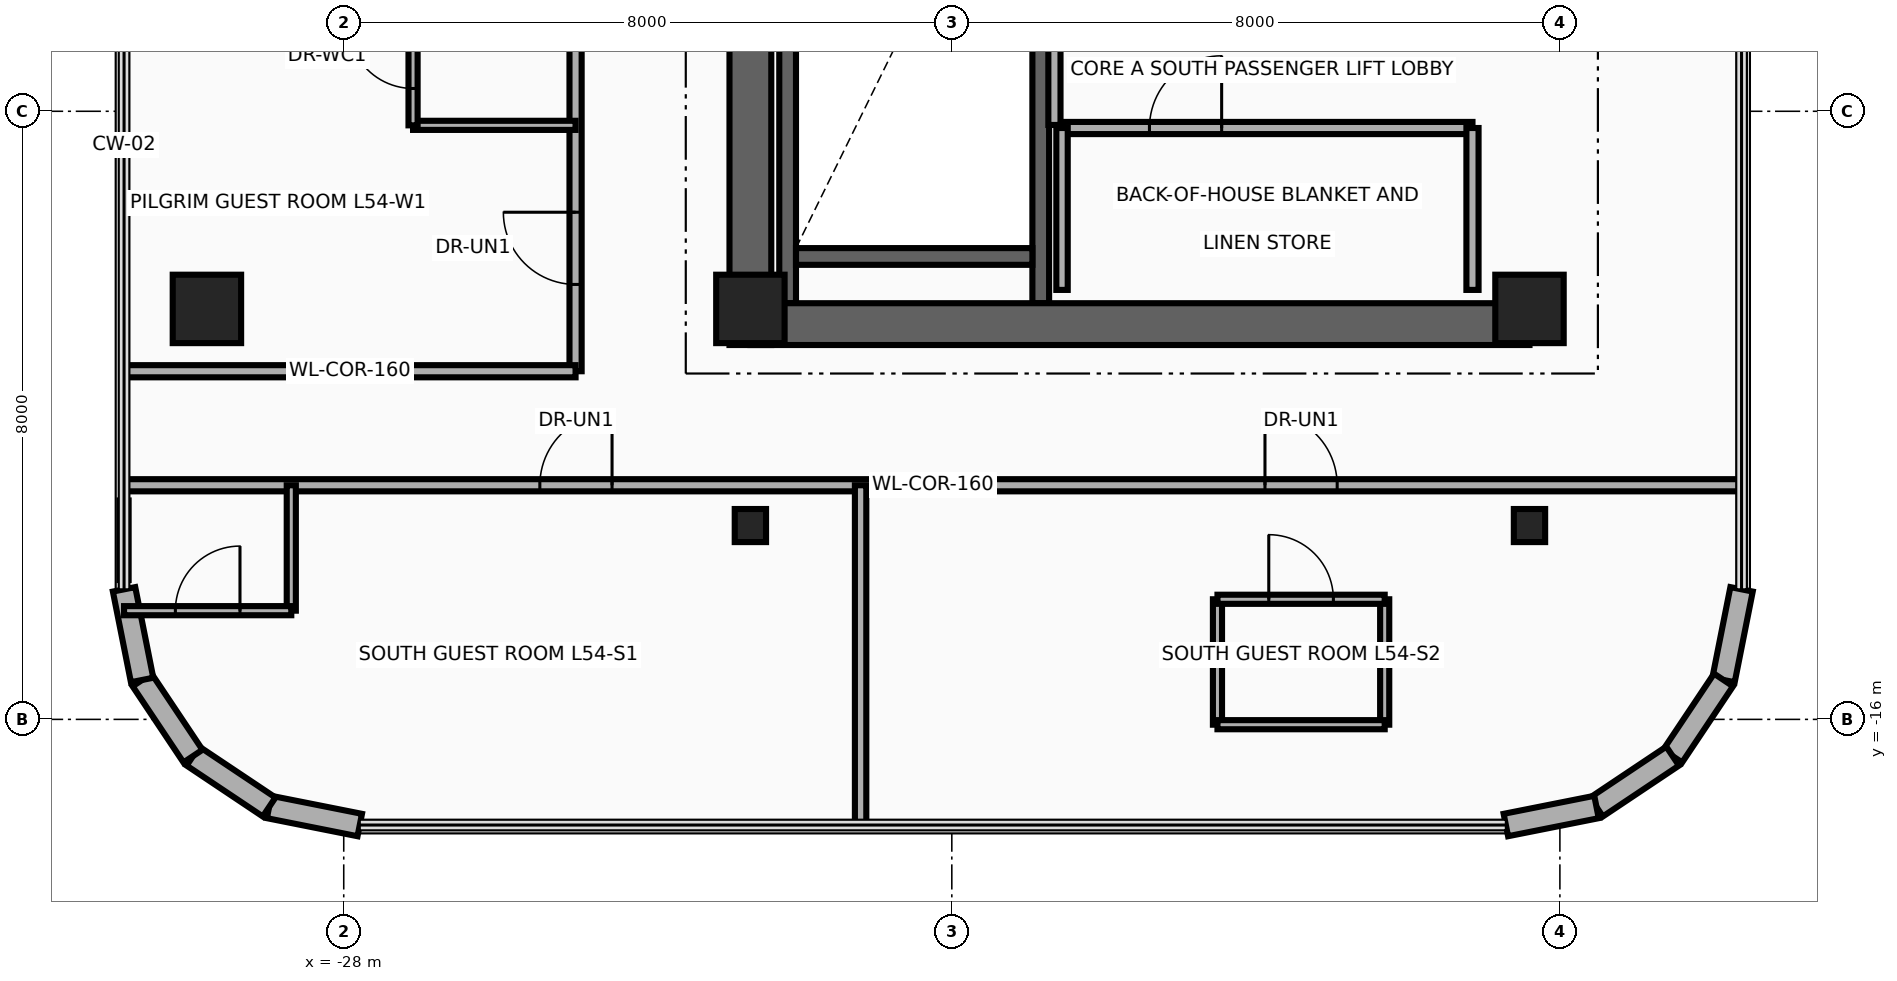
"""IFC4 building model, lengths in metres.
Left out: names, types, materials, properties, quantities, classifications, styles, units other than length and angle.
Written with IfcOpenShell. Run it as: python <this file> out.ifc"""

import sys

from ifc_helpers import new_model, si_unit, direction, frame, frame_2d, origin, origin_2d, place, context, subcontext, project, spatial, rectangle, i_section, extrude, source, transform, mapped, element, fill, save


model = new_model("IFC4")
c1 = context("Model", 3, precision=1e-05, world=origin(), true_north=direction((0.0, 1.0)))
c2 = subcontext(c1, "Body", "Model", "MODEL_VIEW")
j1 = project(units=[si_unit("LENGTHUNIT", "METRE"), si_unit("PLANEANGLEUNIT", "RADIAN")], contexts=[c1])
p1 = place(None, origin())
s1 = spatial("IfcSite", under=j1, at=p1, CompositionType="ELEMENT")
p2 = place(p1, origin())
s2 = spatial("IfcBuilding", under=s1, at=p2, CompositionType="ELEMENT")
p3 = place(p2, frame((0.0, 0.0, 212.5)))
s3 = spatial("IfcBuildingStorey", under=s2, at=p3, CompositionType="ELEMENT", Elevation=212.5)
for number, where, z_axis, x_axis in (
    (1, (-22.16, -10.525, 0.0), (0.0, 0.0, 1.0), (0.0, 1.0, 0.0)),
    (2, (-18.83, -10.525, 0.0), (0.0, 0.0, 1.0), (0.0, 1.0, 0.0)),
):
    element("IfcWall", number, at=place(p3, frame(where, z_axis=z_axis, x_axis=x_axis)), inside=s3, PredefinedType="SHEAR", context=c2, shape_type="SweptSolid", body=[
        extrude(rectangle(XDim=8.745, YDim=0.22, at=frame_2d((4.373, 0.0))), origin(), (0.0, 0.0, 1.0), 3.26),
    ])
p4 = place(p3, frame((-22.05, -9.91, 0.0), z_axis=(0.0, 0.0, 1.0), x_axis=(1.0, 0.0, 0.0)))
e3 = element("IfcWall", 3, at=p4, inside=s3, PredefinedType="SHEAR", context=c2, shape_type="SweptSolid", body=[
    extrude(rectangle(XDim=3.11, YDim=0.22, at=frame_2d((1.555, 0.0))), origin(), (0.0, 0.0, 1.0), 3.26),
])
p5 = place(p3, frame((-22.65, -11.075, 0.0), z_axis=(0.0, 0.0, 1.0), x_axis=(0.0, 1.0, 0.0)))
e4 = element("IfcWall", 4, at=p5, inside=s3, PredefinedType="SHEAR", context=c2, shape_type="SweptSolid", body=[
    extrude(rectangle(XDim=22.15, YDim=0.55, at=frame_2d((11.075, 0.0))), origin(), (0.0, 0.0, 1.0), 3.26),
])
p6 = place(p3, frame((-22.65, -10.8, 0.0), z_axis=(0.0, 0.0, 1.0), x_axis=(1.0, 0.0, 0.0)))
e5 = element("IfcWall", 5, at=p6, inside=s3, PredefinedType="SHEAR", context=c2, shape_type="SweptSolid", body=[
    extrude(rectangle(XDim=10.25, YDim=0.55, at=frame_2d((5.125, 0.0))), origin(), (0.0, 0.0, 1.0), 3.26),
])
m1 = source(origin(), c2, "Body", "SweptSolid", [
    extrude(rectangle(XDim=0.9, YDim=0.9, at=origin_2d()), origin(), (0.0, 0.0, 1.0), 3.5),
])
for number, where, z_axis, x_axis in (
    (6, (-29.8, -10.6, 0.0), (0.0, 0.0, 1.0), (1.0, 0.0, 0.0)),
    (7, (-22.65, -10.6, 0.0), (0.0, 0.0, 1.0), (1.0, 0.0, 0.0)),
    (8, (-12.4, -10.6, 0.0), (0.0, 0.0, 1.0), (1.0, 0.0, 0.0)),
):
    element("IfcColumn", number, at=place(p3, frame(where, z_axis=z_axis, x_axis=x_axis)), inside=s3, PredefinedType="COLUMN", context=c2, shape_type="MappedRepresentation", body=[
        mapped(m1, transform((0.0, 0.0, 0.0), x_axis=(1.0, 0.0, 0.0), y_axis=(0.0, 1.0, 0.0), z_axis=(0.0, 0.0, 1.0), scale=1.0)),
    ])
m2 = source(origin(), c2, "Body", "SweptSolid", [
    extrude(i_section(OverallWidth=0.412, OverallDepth=0.435, WebThickness=0.036, FlangeThickness=0.057, at=origin_2d()), origin(), (0.0, 0.0, 1.0), 3.5),
])
for number, where, z_axis, x_axis in (
    (9, (-22.65, -13.45, 0.0), (0.0, 0.0, 1.0), (1.0, 0.0, 0.0)),
    (10, (-12.4, -13.45, 0.0), (0.0, 0.0, 1.0), (1.0, 0.0, 0.0)),
):
    element("IfcColumn", number, at=place(p3, frame(where, z_axis=z_axis, x_axis=x_axis)), inside=s3, PredefinedType="COLUMN", context=c2, shape_type="MappedRepresentation", body=[
        mapped(m2, transform((0.0, 0.0, 0.0), x_axis=(1.0, 0.0, 0.0), y_axis=(0.0, 1.0, 0.0), z_axis=(0.0, 0.0, 1.0), scale=1.0)),
    ])
p7 = place(p3, frame((-9.61, -14.289, 0.0), z_axis=(0.0, 0.0, 1.0), x_axis=(-0.194996050505, -0.980804027463, 0.0)))
e11 = element("IfcWall", 11, at=p7, inside=s3, PredefinedType="SOLIDWALL", context=c2, shape_type="SweptSolid", body=[
    extrude(rectangle(XDim=1.216, YDim=0.3, at=frame_2d((0.608, 0.0))), origin(), (0.0, 0.0, 1.0), 3.26),
])
for number, where, z_axis, x_axis in (
    (12, (-9.847, -15.482, 0.0), (0.0, 0.0, 1.0), (-0.556, -0.831, 0.0)),
    (13, (-10.517, -16.483, 0.0), (0.0, 0.0, 1.0), (-0.831, -0.556, 0.0)),
):
    element("IfcWall", number, at=place(p3, frame(where, z_axis=z_axis, x_axis=x_axis)), inside=s3, PredefinedType="SOLIDWALL", context=c2, shape_type="SweptSolid", body=[
        extrude(rectangle(XDim=1.205, YDim=0.3, at=frame_2d((0.603, 0.0))), origin(), (0.0, 0.0, 1.0), 3.26),
    ])
for number, where, z_axis, x_axis in (
    (14, (-11.518, -17.153, 0.0), (0.0, 0.0, 1.0), (-0.981, -0.195, 0.0)),
    (15, (-27.789, -17.39, 0.0), (0.0, 0.0, 1.0), (-0.981, 0.195, 0.0)),
):
    element("IfcWall", number, at=place(p3, frame(where, z_axis=z_axis, x_axis=x_axis)), inside=s3, PredefinedType="SOLIDWALL", context=c2, shape_type="SweptSolid", body=[
        extrude(rectangle(XDim=1.216, YDim=0.3, at=frame_2d((0.608, 0.0))), origin(), (0.0, 0.0, 1.0), 3.26),
    ])
for number, where, z_axis, x_axis in (
    (16, (-28.982, -17.153, 0.0), (0.0, 0.0, 1.0), (-0.831, 0.556, 0.0)),
    (17, (-29.983, -16.483, 0.0), (0.0, 0.0, 1.0), (-0.556, 0.831, 0.0)),
):
    element("IfcWall", number, at=place(p3, frame(where, z_axis=z_axis, x_axis=x_axis)), inside=s3, PredefinedType="SOLIDWALL", context=c2, shape_type="SweptSolid", body=[
        extrude(rectangle(XDim=1.205, YDim=0.3, at=frame_2d((0.603, 0.0))), origin(), (0.0, 0.0, 1.0), 3.26),
    ])
p8 = place(p3, frame((-30.653, -15.482, 0.0), z_axis=(0.0, 0.0, 1.0), x_axis=(-0.194996050505, 0.980804027463, 0.0)))
e18 = element("IfcWall", 18, at=p8, inside=s3, PredefinedType="SOLIDWALL", context=c2, shape_type="SweptSolid", body=[
    extrude(rectangle(XDim=1.216, YDim=0.3, at=frame_2d((0.608, 0.0))), origin(), (0.0, 0.0, 1.0), 3.26),
])
p9 = place(p3, frame((-18.65, -8.18, 0.0), z_axis=(0.0, 0.0, 1.0), x_axis=(0.0, 1.0, 0.0)))
e19 = element("IfcWall", 19, at=p9, inside=s3, PredefinedType="PARTITIONING", context=c2, shape_type="SweptSolid", body=[
    extrude(rectangle(XDim=1.56, YDim=0.16, at=frame_2d((0.78, 0.0))), origin(), (0.0, 0.0, 1.0), 3.26),
])
p10 = place(p3, frame((-18.55, -8.22, 0.0), z_axis=(0.0, 0.0, 1.0), x_axis=(1.0, 0.0, 0.0)))
e20 = element("IfcWall", 20, at=p10, inside=s3, PredefinedType="PARTITIONING", context=c2, shape_type="SweptSolid", body=[
    extrude(rectangle(XDim=5.4, YDim=0.16, at=frame_2d((2.7, 0.0))), origin(), (0.0, 0.0, 1.0), 3.26),
])
p11 = place(p10, frame((1.15, 0.0, 0.0)))
e21 = element("IfcOpeningElement", 21, at=p11, cuts=e20, PredefinedType="OPENING", context=c2, shape_type="SweptSolid", body=[
    extrude(rectangle(XDim=0.95, YDim=2.15, at=frame_2d((0.475, 1.075))), frame((0.0, 0.095, 0.0), z_axis=(0.0, -1.0, 0.0), x_axis=(1.0, 0.0, 0.0)), (0.0, 0.0, 1.0), 0.19),
])
p12 = place(p3, frame((-18.55, -10.35, 0.0), z_axis=(0.0, 0.0, 1.0), x_axis=(0.0, 1.0, 0.0)))
e22 = element("IfcWall", 22, at=p12, inside=s3, PredefinedType="PARTITIONING", context=c2, shape_type="SweptSolid", body=[
    extrude(rectangle(XDim=2.13, YDim=0.15, at=frame_2d((1.065, 0.0))), origin(), (0.0, 0.0, 1.0), 3.26),
])
p13 = place(p3, frame((-13.15, -10.35, 0.0), z_axis=(0.0, 0.0, 1.0), x_axis=(0.0, 1.0, 0.0)))
e23 = element("IfcWall", 23, at=p13, inside=s3, PredefinedType="PARTITIONING", context=c2, shape_type="SweptSolid", body=[
    extrude(rectangle(XDim=2.13, YDim=0.16, at=frame_2d((1.065, 0.0))), origin(), (0.0, 0.0, 1.0), 3.26),
])
p14 = place(p3, frame((-24.95, -11.42, 0.0), z_axis=(0.0, 0.0, 1.0), x_axis=(0.0, 1.0, 0.0)))
e24 = element("IfcWall", 24, at=p14, inside=s3, PredefinedType="PARTITIONING", context=c2, shape_type="SweptSolid", body=[
    extrude(rectangle(XDim=20.22, YDim=0.16, at=frame_2d((10.11, 0.0))), origin(), (0.0, 0.0, 1.0), 2.544),
])
p15 = place(p14, frame((1.142, 0.0, 0.0)))
e25 = element("IfcOpeningElement", 25, at=p15, cuts=e24, PredefinedType="OPENING", context=c2, shape_type="SweptSolid", body=[
    extrude(rectangle(XDim=0.95, YDim=2.15, at=frame_2d((0.475, 1.075))), frame((0.0, 0.095, 0.0), z_axis=(0.0, -1.0, 0.0), x_axis=(1.0, 0.0, 0.0)), (0.0, 0.0, 1.0), 0.19),
])
p16 = place(p14, frame((8.018, 0.0, 0.0)))
e26 = element("IfcOpeningElement", 26, at=p16, cuts=e24, PredefinedType="OPENING", context=c2, shape_type="SweptSolid", body=[
    extrude(rectangle(XDim=0.95, YDim=2.15, at=frame_2d((0.475, 1.075))), frame((0.0, 0.095, 0.0), z_axis=(0.0, -1.0, 0.0), x_axis=(1.0, 0.0, 0.0)), (0.0, 0.0, 1.0), 0.19),
])
p17 = place(p14, frame((11.252, 0.0, 0.0)))
e27 = element("IfcOpeningElement", 27, at=p17, cuts=e24, PredefinedType="OPENING", context=c2, shape_type="SweptSolid", body=[
    extrude(rectangle(XDim=0.95, YDim=2.15, at=frame_2d((0.475, 1.075))), frame((0.0, 0.095, 0.0), z_axis=(0.0, -1.0, 0.0), x_axis=(1.0, 0.0, 0.0)), (0.0, 0.0, 1.0), 0.19),
])
p18 = place(p14, frame((18.127, 0.0, 0.0)))
e28 = element("IfcOpeningElement", 28, at=p18, cuts=e24, PredefinedType="OPENING", context=c2, shape_type="SweptSolid", body=[
    extrude(rectangle(XDim=0.95, YDim=2.15, at=frame_2d((0.475, 1.075))), frame((0.0, 0.095, 0.0), z_axis=(0.0, -1.0, 0.0), x_axis=(1.0, 0.0, 0.0)), (0.0, 0.0, 1.0), 0.19),
])
p19 = place(p3, frame((-27.088, -8.185, 0.0), z_axis=(0.0, 0.0, 1.0), x_axis=(1.0, 0.0, 0.0)))
e29 = element("IfcWall", 29, at=p19, inside=s3, PredefinedType="PARTITIONING", context=c2, shape_type="SweptSolid", body=[
    extrude(rectangle(XDim=2.138, YDim=0.12, at=frame_2d((1.069, 0.0))), origin(), (0.0, 0.0, 1.0), 3.26),
])
p20 = place(p3, frame((-27.088, -8.185, 0.0), z_axis=(0.0, 0.0, 1.0), x_axis=(0.0, 1.0, 0.0)))
e30 = element("IfcWall", 30, at=p20, inside=s3, PredefinedType="PARTITIONING", context=c2, shape_type="SweptSolid", body=[
    extrude(rectangle(XDim=1.82, YDim=0.12, at=frame_2d((0.91, 0.0))), origin(), (0.0, 0.0, 1.0), 2.788),
])
p21 = place(p20, frame((0.485, 0.0, 0.0)))
e31 = element("IfcOpeningElement", 31, at=p21, cuts=e30, PredefinedType="OPENING", context=c2, shape_type="SweptSolid", body=[
    extrude(rectangle(XDim=0.85, YDim=2.1, at=frame_2d((0.425, 1.05))), frame((0.0, 0.075, 0.0), z_axis=(0.0, -1.0, 0.0), x_axis=(1.0, 0.0, 0.0)), (0.0, 0.0, 1.0), 0.15),
])
p22 = place(p3, frame((-30.89, -12.92, 0.0), z_axis=(0.0, 0.0, 1.0), x_axis=(1.0, 0.0, 0.0)))
e32 = element("IfcWall", 32, at=p22, inside=s3, PredefinedType="PARTITIONING", context=c2, shape_type="SweptSolid", body=[
    extrude(rectangle(XDim=21.28, YDim=0.16, at=frame_2d((10.64, 0.0))), origin(), (0.0, 0.0, 1.0), 2.634),
])
p23 = place(p22, frame((5.47, 0.0, 0.0)))
e33 = element("IfcOpeningElement", 33, at=p23, cuts=e32, PredefinedType="OPENING", context=c2, shape_type="SweptSolid", body=[
    extrude(rectangle(XDim=0.95, YDim=2.15, at=frame_2d((0.475, 1.075))), frame((0.0, 0.095, 0.0), z_axis=(0.0, -1.0, 0.0), x_axis=(1.0, 0.0, 0.0)), (0.0, 0.0, 1.0), 0.19),
])
p24 = place(p22, frame((15.01, 0.0, 0.0)))
e34 = element("IfcOpeningElement", 34, at=p24, cuts=e32, PredefinedType="OPENING", context=c2, shape_type="SweptSolid", body=[
    extrude(rectangle(XDim=0.95, YDim=2.15, at=frame_2d((0.475, 1.075))), frame((0.0, 0.095, 0.0), z_axis=(0.0, -1.0, 0.0), x_axis=(1.0, 0.0, 0.0)), (0.0, 0.0, 1.0), 0.19),
])
p25 = place(p3, frame((-21.2, -17.39, 0.0), z_axis=(0.0, 0.0, 1.0), x_axis=(0.0, 1.0, 0.0)))
e35 = element("IfcWall", 35, at=p25, inside=s3, PredefinedType="PARTITIONING", context=c2, shape_type="SweptSolid", body=[
    extrude(rectangle(XDim=4.47, YDim=0.15, at=frame_2d((2.235, 0.0))), origin(), (0.0, 0.0, 1.0), 2.706),
])
p26 = place(p3, frame((-28.69, -14.57, 0.0), z_axis=(0.0, 0.0, 1.0), x_axis=(0.0, 1.0, 0.0)))
e36 = element("IfcWall", 36, at=p26, inside=s3, PredefinedType="PARTITIONING", context=c2, shape_type="SweptSolid", body=[
    extrude(rectangle(XDim=1.65, YDim=0.12, at=frame_2d((0.825, 0.0))), origin(), (0.0, 0.0, 1.0), 3.26),
])
p27 = place(p3, frame((-30.89, -14.57, 0.0), z_axis=(0.0, 0.0, 1.0), x_axis=(1.0, 0.0, 0.0)))
e37 = element("IfcWall", 37, at=p27, inside=s3, PredefinedType="PARTITIONING", context=c2, shape_type="SweptSolid", body=[
    extrude(rectangle(XDim=2.2, YDim=0.12, at=frame_2d((1.1, 0.0))), origin(), (0.0, 0.0, 1.0), 3.26),
])
p28 = place(p27, frame((0.675, 0.0, 0.0)))
e38 = element("IfcOpeningElement", 38, at=p28, cuts=e37, PredefinedType="OPENING", context=c2, shape_type="SweptSolid", body=[
    extrude(rectangle(XDim=0.85, YDim=2.1, at=frame_2d((0.425, 1.05))), frame((0.0, 0.075, 0.0), z_axis=(0.0, -1.0, 0.0), x_axis=(1.0, 0.0, 0.0)), (0.0, 0.0, 1.0), 0.15),
])
p29 = place(p3, frame((-30.89, -14.167, 0.0), z_axis=(0.0, 0.0, 1.0), x_axis=(0.0, 1.0, 0.0)))
e39 = element("IfcWall", 39, at=p29, inside=s3, PredefinedType="PARTITIONING", context=c2, shape_type="SweptSolid", body=[
    extrude(rectangle(XDim=1.047, YDim=0.12, at=frame_2d((0.523, 0.0))), origin(), (0.0, 0.0, 1.0), 3.26),
])
for number, where, z_axis, x_axis in (
    (40, (-16.505, -16.07, 0.0), (0.0, 0.0, 1.0), (0.0, 1.0, 0.0)),
    (41, (-14.305, -16.07, 0.0), (0.0, 0.0, 1.0), (0.0, 1.0, 0.0)),
):
    element("IfcWall", number, at=place(p3, frame(where, z_axis=z_axis, x_axis=x_axis)), inside=s3, PredefinedType="PARTITIONING", context=c2, shape_type="SweptSolid", body=[
        extrude(rectangle(XDim=1.65, YDim=0.12, at=frame_2d((0.825, 0.0))), origin(), (0.0, 0.0, 1.0), 3.26),
    ])
p30 = place(p3, frame((-16.505, -16.07, 0.0), z_axis=(0.0, 0.0, 1.0), x_axis=(1.0, 0.0, 0.0)))
e42 = element("IfcWall", 42, at=p30, inside=s3, PredefinedType="PARTITIONING", context=c2, shape_type="SweptSolid", body=[
    extrude(rectangle(XDim=2.2, YDim=0.12, at=frame_2d((1.1, 0.0))), origin(), (0.0, 0.0, 1.0), 3.26),
])
p31 = place(p3, frame((-16.505, -14.42, 0.0), z_axis=(0.0, 0.0, 1.0), x_axis=(1.0, 0.0, 0.0)))
e43 = element("IfcWall", 43, at=p31, inside=s3, PredefinedType="PARTITIONING", context=c2, shape_type="SweptSolid", body=[
    extrude(rectangle(XDim=2.2, YDim=0.12, at=frame_2d((1.1, 0.0))), origin(), (0.0, 0.0, 1.0), 3.26),
])
p32 = place(p31, frame((0.675, 0.0, 0.0)))
e44 = element("IfcOpeningElement", 44, at=p32, cuts=e43, PredefinedType="OPENING", context=c2, shape_type="SweptSolid", body=[
    extrude(rectangle(XDim=0.85, YDim=2.1, at=frame_2d((0.425, 1.05))), frame((0.0, 0.075, 0.0), z_axis=(0.0, -1.0, 0.0), x_axis=(1.0, 0.0, 0.0)), (0.0, 0.0, 1.0), 0.15),
])
p33 = place(p3, frame((-30.89, -11.42, 0.0), z_axis=(0.0, 0.0, 1.0), x_axis=(1.0, 0.0, 0.0)))
e45 = element("IfcWall", 45, at=p33, inside=s3, PredefinedType="PARTITIONING", context=c2, shape_type="SweptSolid", body=[
    extrude(rectangle(XDim=5.94, YDim=0.16, at=frame_2d((2.97, 0.0))), origin(), (0.0, 0.0, 1.0), 3.26),
])
p34 = place(p11, origin())
e46 = element("IfcDoor", 46, at=p34, inside=s3, OperationType="SINGLE_SWING_RIGHT", PredefinedType="DOOR", context=c2, shape_type="SweptSolid", body=[
    extrude(rectangle(XDim=0.95, YDim=2.15, at=frame_2d((0.475, 1.075))), frame((0.0, 0.025, 0.0), z_axis=(0.0, -1.0, 0.0), x_axis=(1.0, 0.0, 0.0)), (0.0, 0.0, 1.0), 0.05),
])
fill(e21, e46)
p35 = place(p15, origin())
e47 = element("IfcDoor", 47, at=p35, inside=s3, OperationType="SINGLE_SWING_RIGHT", PredefinedType="DOOR", context=c2, shape_type="SweptSolid", body=[
    extrude(rectangle(XDim=0.95, YDim=2.15, at=frame_2d((0.475, 1.075))), frame((0.0, 0.025, 0.0), z_axis=(0.0, -1.0, 0.0), x_axis=(1.0, 0.0, 0.0)), (0.0, 0.0, 1.0), 0.05),
])
fill(e25, e47)
p36 = place(p21, origin())
e48 = element("IfcDoor", 48, at=p36, inside=s3, OperationType="SINGLE_SWING_LEFT", PredefinedType="DOOR", context=c2, shape_type="SweptSolid", body=[
    extrude(rectangle(XDim=0.85, YDim=2.1, at=frame_2d((0.425, 1.05))), frame((0.0, 0.025, 0.0), z_axis=(0.0, -1.0, 0.0), x_axis=(1.0, 0.0, 0.0)), (0.0, 0.0, 1.0), 0.05),
])
fill(e31, e48)
p37 = place(p23, origin())
e49 = element("IfcDoor", 49, at=p37, inside=s3, OperationType="SINGLE_SWING_RIGHT", PredefinedType="DOOR", context=c2, shape_type="SweptSolid", body=[
    extrude(rectangle(XDim=0.95, YDim=2.15, at=frame_2d((0.475, 1.075))), frame((0.0, 0.025, 0.0), z_axis=(0.0, -1.0, 0.0), x_axis=(1.0, 0.0, 0.0)), (0.0, 0.0, 1.0), 0.05),
])
fill(e33, e49)
p38 = place(p28, origin())
e50 = element("IfcDoor", 50, at=p38, inside=s3, OperationType="SINGLE_SWING_LEFT", PredefinedType="DOOR", context=c2, shape_type="SweptSolid", body=[
    extrude(rectangle(XDim=0.85, YDim=2.1, at=frame_2d((0.425, 1.05))), frame((0.0, 0.025, 0.0), z_axis=(0.0, -1.0, 0.0), x_axis=(1.0, 0.0, 0.0)), (0.0, 0.0, 1.0), 0.05),
])
fill(e38, e50)
p39 = place(p24, origin())
e51 = element("IfcDoor", 51, at=p39, inside=s3, OperationType="SINGLE_SWING_RIGHT", PredefinedType="DOOR", context=c2, shape_type="SweptSolid", body=[
    extrude(rectangle(XDim=0.95, YDim=2.15, at=frame_2d((0.475, 1.075))), frame((0.0, 0.025, 0.0), z_axis=(0.0, -1.0, 0.0), x_axis=(1.0, 0.0, 0.0)), (0.0, 0.0, 1.0), 0.05),
])
fill(e34, e51)
p40 = place(p32, origin())
e52 = element("IfcDoor", 52, at=p40, inside=s3, OperationType="SINGLE_SWING_LEFT", PredefinedType="DOOR", context=c2, shape_type="SweptSolid", body=[
    extrude(rectangle(XDim=0.85, YDim=2.1, at=frame_2d((0.425, 1.05))), frame((0.0, 0.025, 0.0), z_axis=(0.0, -1.0, 0.0), x_axis=(1.0, 0.0, 0.0)), (0.0, 0.0, 1.0), 0.05),
])
fill(e44, e52)
save(model, sys.argv[1])
